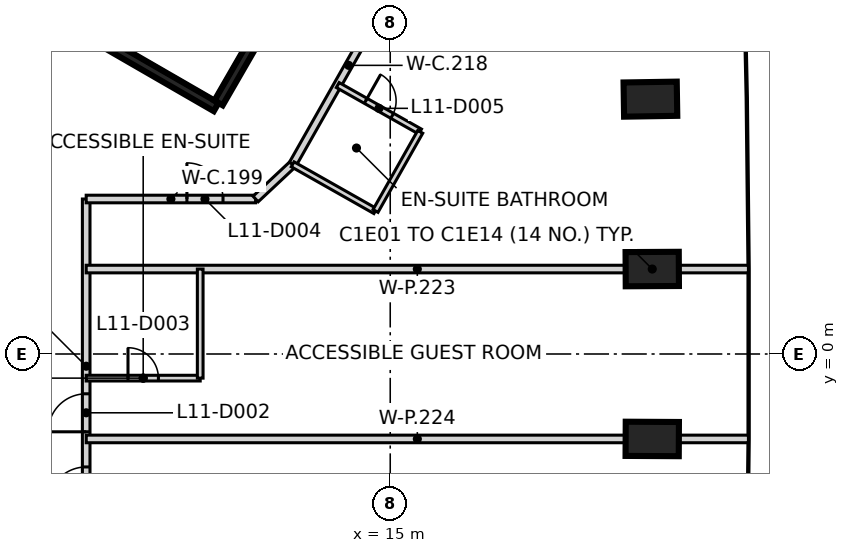
"""IFC4 building model, lengths in metres.
Left out: names, types, materials, properties, quantities, classifications, styles, units other than length and angle.
Written with IfcOpenShell. Run it as: python <this file> out.ifc"""

import sys

from ifc_helpers import new_model, si_unit, direction, frame, frame_2d, origin, origin_2d, place, context, subcontext, project, spatial, rectangle, extrude, element, fill, save


model = new_model("IFC4")
c1 = context("Model", 3, precision=1e-05, world=origin(), true_north=direction((0.0, 1.0)))
c2 = subcontext(c1, "Body", "Model", "MODEL_VIEW")
j1 = project(units=[si_unit("LENGTHUNIT", "METRE"), si_unit("PLANEANGLEUNIT", "RADIAN")], contexts=[c1])
p1 = place(None, origin())
s1 = spatial("IfcSite", under=j1, at=p1, CompositionType="ELEMENT")
p2 = place(p1, origin())
s2 = spatial("IfcBuilding", under=s1, at=p2, CompositionType="ELEMENT")
p3 = place(p2, frame((0.0, 0.0, 53.0)))
s3 = spatial("IfcBuildingStorey", under=s2, at=p3, CompositionType="ELEMENT", Elevation=53.0)
for number, where, z_axis, x_axis in (
    (1, (21.894, -2.235, -0.475), (0.0, 0.0, 1.0), (-1.0, 0.005, 0.0)),
    (2, (21.894, 2.235, -0.475), (0.0, 0.0, 1.0), (1.0, 0.005, 0.0)),
    (3, (21.846, 6.706, -0.475), (0.0, 0.0, 1.0), (1.0, 0.016, 0.0)),
):
    element("IfcColumn", number, at=place(p3, frame(where, z_axis=z_axis, x_axis=x_axis)), inside=s3, PredefinedType="COLUMN", context=c2, shape_type="SweptSolid", body=[
        extrude(rectangle(XDim=1.4, YDim=0.9, at=origin_2d()), origin(), (0.0, 0.0, 1.0), 3.6),
    ])
p4 = place(p3, frame((10.42, 6.498, 0.0), z_axis=(0.0, 0.0, 1.0), x_axis=(-0.866021906294, 0.500006057782, 0.0)))
e4 = element("IfcWall", 4, at=p4, inside=s3, PredefinedType="SHEAR", context=c2, shape_type="SweptSolid", body=[
    extrude(rectangle(XDim=11.55, YDim=0.25, at=frame_2d((5.775, 0.0))), origin(), (0.0, 0.0, 1.0), 3.125),
])
p5 = place(p4, frame((10.025, 0.0, 0.0)))
e5 = element("IfcOpeningElement", 5, at=p5, cuts=e4, PredefinedType="OPENING", context=c2, shape_type="SweptSolid", body=[
    extrude(rectangle(XDim=1.2, YDim=2.1, at=frame_2d((0.6, 1.05))), frame((0.0, 0.135, 0.0), z_axis=(0.0, -1.0, 0.0), x_axis=(1.0, 0.0, 0.0)), (0.0, 0.0, 1.0), 0.27),
])
p6 = place(p4, frame((8.725, 0.0, 0.0)))
e6 = element("IfcOpeningElement", 6, at=p6, cuts=e4, PredefinedType="OPENING", context=c2, shape_type="SweptSolid", body=[
    extrude(rectangle(XDim=1.2, YDim=2.1, at=frame_2d((0.6, 1.05))), frame((0.0, 0.135, 0.0), z_axis=(0.0, -1.0, 0.0), x_axis=(1.0, 0.0, 0.0)), (0.0, 0.0, 1.0), 0.27),
])
p7 = place(p3, frame((13.238, 11.378, 0.0), z_axis=(0.0, 0.0, 1.0), x_axis=(-0.500008851346, -0.866020293397, 0.0)))
e7 = element("IfcWall", 7, at=p7, inside=s3, PredefinedType="SHEAR", context=c2, shape_type="SweptSolid", body=[
    extrude(rectangle(XDim=5.51, YDim=0.25, at=frame_2d((2.755, 0.0))), origin(), (0.0, 0.0, 1.0), 3.125),
])
p8 = place(p3, frame((7.0, -4.721, 0.0), z_axis=(0.0, 0.0, 1.0), x_axis=(0.0, 1.0, 0.0)))
e8 = element("IfcWall", 8, at=p8, inside=s3, PredefinedType="PARTITIONING", context=c2, shape_type="SweptSolid", body=[
    extrude(rectangle(XDim=8.799, YDim=0.2, at=frame_2d((4.399, 0.0))), origin(), (0.0, 0.0, 1.0), 3.125),
])
p9 = place(p8, frame((0.749, 0.0, 0.0)))
e9 = element("IfcOpeningElement", 9, at=p9, cuts=e8, PredefinedType="OPENING", context=c2, shape_type="SweptSolid", body=[
    extrude(rectangle(XDim=1.0, YDim=2.1, at=frame_2d((0.5, 1.05))), frame((0.0, 0.11, 0.0), z_axis=(0.0, -1.0, 0.0), x_axis=(1.0, 0.0, 0.0)), (0.0, 0.0, 1.0), 0.22),
])
p10 = place(p8, frame((2.674, 0.0, 0.0)))
e10 = element("IfcOpeningElement", 10, at=p10, cuts=e8, PredefinedType="OPENING", context=c2, shape_type="SweptSolid", body=[
    extrude(rectangle(XDim=1.0, YDim=2.1, at=frame_2d((0.5, 1.05))), frame((0.0, 0.11, 0.0), z_axis=(0.0, -1.0, 0.0), x_axis=(1.0, 0.0, 0.0)), (0.0, 0.0, 1.0), 0.22),
])
p11 = place(p3, frame((7.0, 4.078, 0.0), z_axis=(0.0, 0.0, 1.0), x_axis=(1.0, 0.0, 0.0)))
e11 = element("IfcWall", 11, at=p11, inside=s3, PredefinedType="PARTITIONING", context=c2, shape_type="SweptSolid", body=[
    extrude(rectangle(XDim=4.458, YDim=0.2, at=frame_2d((2.229, 0.0))), origin(), (0.0, 0.0, 1.0), 3.125),
])
p12 = place(p11, frame((2.65, 0.0, 0.0)))
e12 = element("IfcOpeningElement", 12, at=p12, cuts=e11, PredefinedType="OPENING", context=c2, shape_type="SweptSolid", body=[
    extrude(rectangle(XDim=0.95, YDim=2.1, at=frame_2d((0.475, 1.05))), frame((0.0, 0.11, 0.0), z_axis=(0.0, -1.0, 0.0), x_axis=(1.0, 0.0, 0.0)), (0.0, 0.0, 1.0), 0.22),
])
p13 = place(p3, frame((11.458, 4.078, 0.0), z_axis=(0.0, 0.0, 1.0), x_axis=(0.729936032318, 0.683515463412, 0.0)))
e13 = element("IfcWall", 13, at=p13, inside=s3, PredefinedType="PARTITIONING", context=c2, shape_type="SweptSolid", body=[
    extrude(rectangle(XDim=1.336, YDim=0.2, at=frame_2d((0.668, 0.0))), origin(), (0.0, 0.0, 1.0), 3.125),
])
p14 = place(p3, frame((12.432, 4.992, 0.0), z_axis=(0.0, 0.0, 1.0), x_axis=(0.492790102015, 0.870148214591, 0.0)))
e14 = element("IfcWall", 14, at=p14, inside=s3, PredefinedType="PARTITIONING", context=c2, shape_type="SweptSolid", body=[
    extrude(rectangle(XDim=5.981, YDim=0.2, at=frame_2d((2.991, 0.0))), origin(), (0.0, 0.0, 1.0), 3.125),
])
p15 = place(p3, frame((7.0, 2.235, 0.0), z_axis=(0.0, 0.0, 1.0), x_axis=(1.0, 0.0, 0.0)))
e15 = element("IfcWall", 15, at=p15, inside=s3, PredefinedType="PARTITIONING", context=c2, shape_type="SweptSolid", body=[
    extrude(rectangle(XDim=17.425, YDim=0.2, at=frame_2d((8.712, 0.0))), origin(), (0.0, 0.0, 1.0), 3.125),
])
p16 = place(p3, frame((7.001, -2.235, 0.0), z_axis=(0.0, 0.0, 1.0), x_axis=(1.0, 0.0, 0.0)))
e16 = element("IfcWall", 16, at=p16, inside=s3, PredefinedType="PARTITIONING", context=c2, shape_type="SweptSolid", body=[
    extrude(rectangle(XDim=17.424, YDim=0.2, at=frame_2d((8.712, 0.0))), origin(), (0.0, 0.0, 1.0), 3.125),
])
p17 = place(p3, frame((7.0, -0.635, 0.0), z_axis=(0.0, 0.0, 1.0), x_axis=(1.0, 0.0, 0.0)))
e17 = element("IfcWall", 17, at=p17, inside=s3, PredefinedType="PARTITIONING", context=c2, shape_type="SweptSolid", body=[
    extrude(rectangle(XDim=3.0, YDim=0.15, at=frame_2d((1.5, 0.0))), origin(), (0.0, 0.0, 1.0), 3.125),
])
p18 = place(p17, frame((1.1, 0.0, 0.0)))
e18 = element("IfcOpeningElement", 18, at=p18, cuts=e17, PredefinedType="OPENING", context=c2, shape_type="SweptSolid", body=[
    extrude(rectangle(XDim=0.8, YDim=2.1, at=frame_2d((0.4, 1.05))), frame((0.0, 0.085, 0.0), z_axis=(0.0, -1.0, 0.0), x_axis=(1.0, 0.0, 0.0)), (0.0, 0.0, 1.0), 0.17),
])
p19 = place(p3, frame((10.0, -0.635, 0.0), z_axis=(0.0, 0.0, 1.0), x_axis=(0.0, 1.0, 0.0)))
e19 = element("IfcWall", 19, at=p19, inside=s3, PredefinedType="PARTITIONING", context=c2, shape_type="SweptSolid", body=[
    extrude(rectangle(XDim=2.87, YDim=0.15, at=frame_2d((1.435, 0.0))), origin(), (0.0, 0.0, 1.0), 3.125),
])
p20 = place(p3, frame((12.433, 4.991, 0.0), z_axis=(0.0, 0.0, 1.0), x_axis=(0.870173052757, -0.49274624124, 0.0)))
e20 = element("IfcWall", 20, at=p20, inside=s3, PredefinedType="PARTITIONING", context=c2, shape_type="SweptSolid", body=[
    extrude(rectangle(XDim=2.498, YDim=0.15, at=frame_2d((1.249, 0.0))), origin(), (0.0, 0.0, 1.0), 3.125),
])
p21 = place(p3, frame((13.619, 7.076, 0.0), z_axis=(0.0, 0.0, 1.0), x_axis=(0.870725399165, -0.491769538758, 0.0)))
e21 = element("IfcWall", 21, at=p21, inside=s3, PredefinedType="PARTITIONING", context=c2, shape_type="SweptSolid", body=[
    extrude(rectangle(XDim=2.489, YDim=0.15, at=frame_2d((1.244, 0.0))), origin(), (0.0, 0.0, 1.0), 3.125),
])
p22 = place(p21, frame((0.845, 0.0, 0.0)))
e22 = element("IfcOpeningElement", 22, at=p22, cuts=e21, PredefinedType="OPENING", context=c2, shape_type="SweptSolid", body=[
    extrude(rectangle(XDim=0.8, YDim=2.1, at=frame_2d((0.4, 1.05))), frame((0.0, 0.085, 0.0), z_axis=(0.0, -1.0, 0.0), x_axis=(1.0, 0.0, 0.0)), (0.0, 0.0, 1.0), 0.17),
])
p23 = place(p3, frame((14.613, 3.764, 0.0), z_axis=(0.0, 0.0, 1.0), x_axis=(0.492121164181, 0.870526713987, 0.0)))
e23 = element("IfcWall", 23, at=p23, inside=s3, PredefinedType="PARTITIONING", context=c2, shape_type="SweptSolid", body=[
    extrude(rectangle(XDim=2.392, YDim=0.15, at=frame_2d((1.196, 0.0))), origin(), (0.0, 0.0, 1.0), 3.125),
])
p24 = place(p9, frame((1.0, 0.0, 0.0), z_axis=(0.0, 0.0, 1.0), x_axis=(-1.0, 0.0, 0.0)))
e24 = element("IfcDoor", 24, at=p24, inside=s3, OperationType="SINGLE_SWING_LEFT", PredefinedType="DOOR", context=c2, shape_type="SweptSolid", body=[
    extrude(rectangle(XDim=1.0, YDim=2.1, at=frame_2d((0.5, 1.05))), frame((0.0, 0.025, 0.0), z_axis=(0.0, -1.0, 0.0), x_axis=(1.0, 0.0, 0.0)), (0.0, 0.0, 1.0), 0.05),
])
fill(e9, e24)
p25 = place(p10, frame((1.0, 0.0, 0.0), z_axis=(0.0, 0.0, 1.0), x_axis=(-1.0, 0.0, 0.0)))
e25 = element("IfcDoor", 25, at=p25, inside=s3, OperationType="SINGLE_SWING_LEFT", PredefinedType="DOOR", context=c2, shape_type="SweptSolid", body=[
    extrude(rectangle(XDim=1.0, YDim=2.1, at=frame_2d((0.5, 1.05))), frame((0.0, 0.025, 0.0), z_axis=(0.0, -1.0, 0.0), x_axis=(1.0, 0.0, 0.0)), (0.0, 0.0, 1.0), 0.05),
])
fill(e10, e25)
p26 = place(p18, origin())
e26 = element("IfcDoor", 26, at=p26, inside=s3, OperationType="SINGLE_SWING_LEFT", PredefinedType="DOOR", context=c2, shape_type="SweptSolid", body=[
    extrude(rectangle(XDim=0.8, YDim=2.1, at=frame_2d((0.4, 1.05))), frame((0.0, 0.025, 0.0), z_axis=(0.0, -1.0, 0.0), x_axis=(1.0, 0.0, 0.0)), (0.0, 0.0, 1.0), 0.05),
])
fill(e18, e26)
p27 = place(p12, origin())
e27 = element("IfcDoor", 27, at=p27, inside=s3, OperationType="SINGLE_SWING_LEFT", PredefinedType="DOOR", context=c2, shape_type="SweptSolid", body=[
    extrude(rectangle(XDim=0.95, YDim=2.1, at=frame_2d((0.475, 1.05))), frame((0.0, 0.025, 0.0), z_axis=(0.0, -1.0, 0.0), x_axis=(1.0, 0.0, 0.0)), (0.0, 0.0, 1.0), 0.05),
])
fill(e12, e27)
p28 = place(p22, origin())
e28 = element("IfcDoor", 28, at=p28, inside=s3, OperationType="SINGLE_SWING_LEFT", PredefinedType="DOOR", context=c2, shape_type="SweptSolid", body=[
    extrude(rectangle(XDim=0.8, YDim=2.1, at=frame_2d((0.4, 1.05))), frame((0.0, 0.025, 0.0), z_axis=(0.0, -1.0, 0.0), x_axis=(1.0, 0.0, 0.0)), (0.0, 0.0, 1.0), 0.05),
])
fill(e22, e28)
save(model, sys.argv[1])
